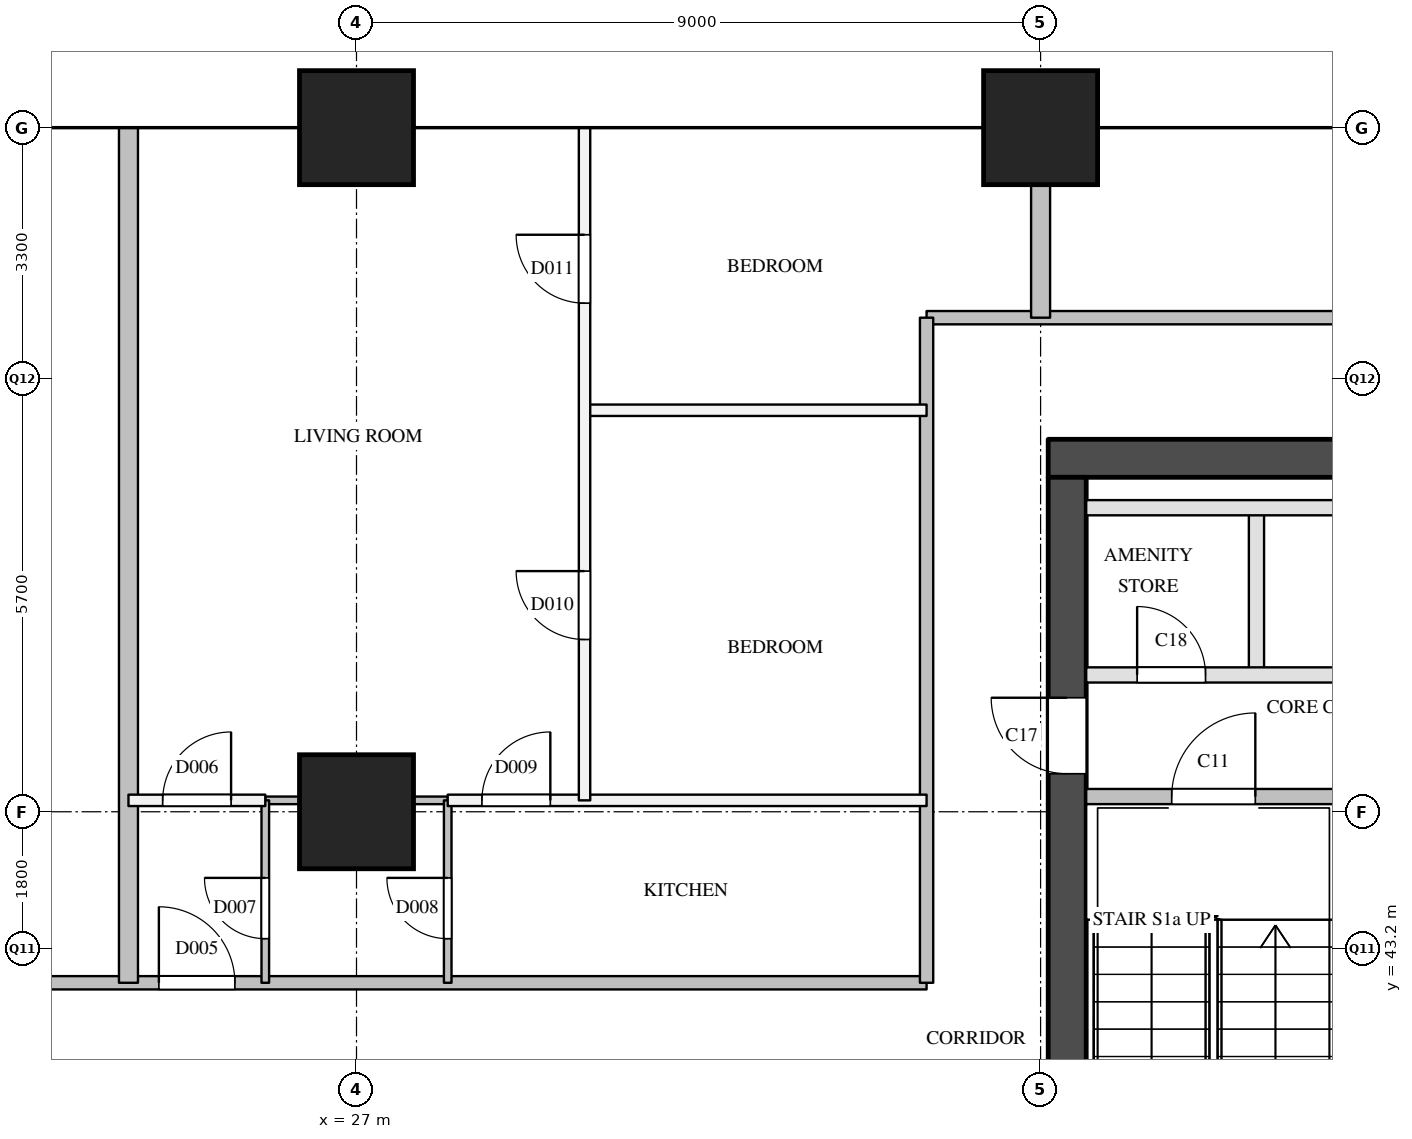
"""IFC4 building model, lengths in metres.
Left out: names, types, materials, properties, quantities, classifications, styles, units other than length and angle.
Written with IfcOpenShell. Run it as: python <this file> out.ifc"""

import sys

from ifc_helpers import new_model, si_unit, direction, frame, frame_2d, origin, origin_2d, place, context, subcontext, project, spatial, rectangle, extrude, element, fill, save


model = new_model("IFC4")
c1 = context("Model", 3, precision=1e-05, world=origin(), true_north=direction((0.0, 1.0)))
c2 = subcontext(c1, "Body", "Model", "MODEL_VIEW")
j1 = project(units=[si_unit("LENGTHUNIT", "METRE"), si_unit("PLANEANGLEUNIT", "RADIAN")], contexts=[c1])
p1 = place(None, origin())
s1 = spatial("IfcSite", under=j1, at=p1, CompositionType="ELEMENT")
p2 = place(p1, origin())
s2 = spatial("IfcBuilding", under=s1, at=p2, CompositionType="ELEMENT")
p3 = place(p2, frame((0.0, 0.0, 129.4)))
s3 = spatial("IfcBuildingStorey", under=s2, at=p3, CompositionType="ELEMENT", Elevation=129.4)
for number, where, z_axis, x_axis in (
    (1, (27.0, 45.0, 0.0), (0.0, 0.0, 1.0), (1.0, 0.0, 0.0)),
    (2, (27.0, 54.0, 0.0), (0.0, 0.0, 1.0), (1.0, 0.0, 0.0)),
    (3, (36.0, 54.0, 0.0), (0.0, 0.0, 1.0), (1.0, 0.0, 0.0)),
):
    element("IfcColumn", number, at=place(p3, frame(where, z_axis=z_axis, x_axis=x_axis)), inside=s3, PredefinedType="COLUMN", context=c2, shape_type="SweptSolid", body=[
        extrude(rectangle(XDim=1.5, YDim=1.5, at=origin_2d()), origin(), (0.0, 0.0, 1.0), 5.5),
    ])
p4 = place(p3, frame((36.1, 49.65, 0.0), z_axis=(0.0, 0.0, 1.0), x_axis=(1.0, 0.0, 0.0)))
e4 = element("IfcWall", 4, at=p4, inside=s3, PredefinedType="SHEAR", context=c2, shape_type="SweptSolid", body=[
    extrude(rectangle(XDim=12.2, YDim=0.5, at=frame_2d((6.1, 0.0))), origin(), (0.0, 0.0, 1.0), 5.2),
])
p5 = place(p3, frame((36.35, 29.1, 0.0), z_axis=(0.0, 0.0, 1.0), x_axis=(0.0, 1.0, 0.0)))
e5 = element("IfcWall", 5, at=p5, inside=s3, PredefinedType="SHEAR", context=c2, shape_type="SweptSolid", body=[
    extrude(rectangle(XDim=20.3, YDim=0.5, at=frame_2d((10.15, 0.0))), origin(), (0.0, 0.0, 1.0), 5.2),
])
p6 = place(p5, frame((3.6, 0.0, 0.0)))
e6 = element("IfcOpeningElement", 6, at=p6, cuts=e5, PredefinedType="OPENING", context=c2, shape_type="SweptSolid", body=[
    extrude(rectangle(XDim=1.8, YDim=2.1, at=frame_2d((0.9, 1.05))), frame((0.0, 0.26, 0.0), z_axis=(0.0, -1.0, 0.0), x_axis=(1.0, 0.0, 0.0)), (0.0, 0.0, 1.0), 0.52),
])
p7 = place(p5, frame((16.4, 0.0, 0.0)))
e7 = element("IfcOpeningElement", 7, at=p7, cuts=e5, PredefinedType="OPENING", context=c2, shape_type="SweptSolid", body=[
    extrude(rectangle(XDim=1.0, YDim=2.1, at=frame_2d((0.5, 1.05))), frame((0.0, 0.26, 0.0), z_axis=(0.0, -1.0, 0.0), x_axis=(1.0, 0.0, 0.0)), (0.0, 0.0, 1.0), 0.52),
])
p8 = place(p3, frame((38.84, 46.8, 0.0), z_axis=(0.0, 0.0, 1.0), x_axis=(0.0, 1.0, 0.0)))
e8 = element("IfcWall", 8, at=p8, inside=s3, PredefinedType="PARTITIONING", context=c2, shape_type="SweptSolid", body=[
    extrude(rectangle(XDim=2.2, YDim=0.2, at=frame_2d((1.1, 0.0))), origin(), (0.0, 0.0, 1.0), 5.2),
])
p9 = place(p3, frame((36.6, 45.2, 0.0), z_axis=(0.0, 0.0, 1.0), x_axis=(1.0, 0.0, 0.0)))
e9 = element("IfcWall", 9, at=p9, inside=s3, PredefinedType="SOLIDWALL", context=c2, shape_type="SweptSolid", body=[
    extrude(rectangle(XDim=3.25, YDim=0.2, at=frame_2d((1.625, 0.0))), origin(), (0.0, 0.0, 1.0), 5.2),
])
p10 = place(p9, frame((1.125, 0.0, 0.0)))
e10 = element("IfcOpeningElement", 10, at=p10, cuts=e9, PredefinedType="OPENING", context=c2, shape_type="SweptSolid", body=[
    extrude(rectangle(XDim=1.1, YDim=2.1, at=frame_2d((0.55, 1.05))), frame((0.0, 0.11, 0.0), z_axis=(0.0, -1.0, 0.0), x_axis=(1.0, 0.0, 0.0)), (0.0, 0.0, 1.0), 0.22),
])
p11 = place(p3, frame((36.6, 46.8, 0.0), z_axis=(0.0, 0.0, 1.0), x_axis=(1.0, 0.0, 0.0)))
e11 = element("IfcWall", 11, at=p11, inside=s3, PredefinedType="PARTITIONING", context=c2, shape_type="SweptSolid", body=[
    extrude(rectangle(XDim=11.2, YDim=0.2, at=frame_2d((5.6, 0.0))), origin(), (0.0, 0.0, 1.0), 5.2),
])
p12 = place(p11, frame((0.67, 0.0, 0.0)))
e12 = element("IfcOpeningElement", 12, at=p12, cuts=e11, PredefinedType="OPENING", context=c2, shape_type="SweptSolid", body=[
    extrude(rectangle(XDim=0.9, YDim=2.1, at=frame_2d((0.45, 1.05))), frame((0.0, 0.11, 0.0), z_axis=(0.0, -1.0, 0.0), x_axis=(1.0, 0.0, 0.0)), (0.0, 0.0, 1.0), 0.22),
])
p13 = place(p11, frame((6.27, 0.0, 0.0)))
e13 = element("IfcOpeningElement", 13, at=p13, cuts=e11, PredefinedType="OPENING", context=c2, shape_type="SweptSolid", body=[
    extrude(rectangle(XDim=0.9, YDim=2.1, at=frame_2d((0.45, 1.05))), frame((0.0, 0.11, 0.0), z_axis=(0.0, -1.0, 0.0), x_axis=(1.0, 0.0, 0.0)), (0.0, 0.0, 1.0), 0.22),
])
p14 = place(p3, frame((36.6, 49.0, 0.0), z_axis=(0.0, 0.0, 1.0), x_axis=(1.0, 0.0, 0.0)))
e14 = element("IfcWall", 14, at=p14, inside=s3, PredefinedType="PARTITIONING", context=c2, shape_type="SweptSolid", body=[
    extrude(rectangle(XDim=11.2, YDim=0.2, at=frame_2d((5.6, 0.0))), origin(), (0.0, 0.0, 1.0), 5.2),
])
p15 = place(p3, frame((19.5, 42.75, 0.0), z_axis=(0.0, 0.0, 1.0), x_axis=(1.0, 0.0, 0.0)))
e15 = element("IfcWall", 15, at=p15, inside=s3, PredefinedType="PARTITIONING", context=c2, shape_type="SweptSolid", body=[
    extrude(rectangle(XDim=15.0, YDim=0.175, at=frame_2d((7.5, 0.0))), origin(), (0.0, 0.0, 1.0), 4.2),
])
p16 = place(p15, frame((4.9, 0.0, 0.0)))
e16 = element("IfcOpeningElement", 16, at=p16, cuts=e15, PredefinedType="OPENING", context=c2, shape_type="SweptSolid", body=[
    extrude(rectangle(XDim=1.0, YDim=2.1, at=frame_2d((0.5, 1.05))), frame((0.0, 0.097, 0.0), z_axis=(0.0, -1.0, 0.0), x_axis=(1.0, 0.0, 0.0)), (0.0, 0.0, 1.0), 0.195),
])
p17 = place(p3, frame((34.5, 51.5, 0.0), z_axis=(0.0, 0.0, 1.0), x_axis=(1.0, 0.0, 0.0)))
e17 = element("IfcWall", 17, at=p17, inside=s3, PredefinedType="PARTITIONING", context=c2, shape_type="SweptSolid", body=[
    extrude(rectangle(XDim=15.4, YDim=0.175, at=frame_2d((7.7, 0.0))), origin(), (0.0, 0.0, 1.0), 5.2),
])
p18 = place(p3, frame((34.5, 42.75, 0.0), z_axis=(0.0, 0.0, 1.0), x_axis=(0.0, 1.0, 0.0)))
e18 = element("IfcWall", 18, at=p18, inside=s3, PredefinedType="PARTITIONING", context=c2, shape_type="SweptSolid", body=[
    extrude(rectangle(XDim=8.75, YDim=0.175, at=frame_2d((4.375, 0.0))), origin(), (0.0, 0.0, 1.0), 5.2),
])
p19 = place(p3, frame((24.0, 45.15, 0.0), z_axis=(0.0, 0.0, 1.0), x_axis=(1.0, 0.0, 0.0)))
e19 = element("IfcWall", 19, at=p19, inside=s3, PredefinedType="PARTITIONING", context=c2, shape_type="SweptSolid", body=[
    extrude(rectangle(XDim=1.8, YDim=0.15, at=frame_2d((0.9, 0.0))), origin(), (0.0, 0.0, 1.0), 5.2),
])
p20 = place(p19, frame((0.45, 0.0, 0.0)))
e20 = element("IfcOpeningElement", 20, at=p20, cuts=e19, PredefinedType="OPENING", context=c2, shape_type="SweptSolid", body=[
    extrude(rectangle(XDim=0.9, YDim=2.1, at=frame_2d((0.45, 1.05))), frame((0.0, 0.085, 0.0), z_axis=(0.0, -1.0, 0.0), x_axis=(1.0, 0.0, 0.0)), (0.0, 0.0, 1.0), 0.17),
])
p21 = place(p3, frame((28.2, 45.15, 0.0), z_axis=(0.0, 0.0, 1.0), x_axis=(1.0, 0.0, 0.0)))
e21 = element("IfcWall", 21, at=p21, inside=s3, PredefinedType="PARTITIONING", context=c2, shape_type="SweptSolid", body=[
    extrude(rectangle(XDim=6.3, YDim=0.15, at=frame_2d((3.15, 0.0))), origin(), (0.0, 0.0, 1.0), 5.2),
])
p22 = place(p21, frame((0.45, 0.0, 0.0)))
e22 = element("IfcOpeningElement", 22, at=p22, cuts=e21, PredefinedType="OPENING", context=c2, shape_type="SweptSolid", body=[
    extrude(rectangle(XDim=0.9, YDim=2.1, at=frame_2d((0.45, 1.05))), frame((0.0, 0.085, 0.0), z_axis=(0.0, -1.0, 0.0), x_axis=(1.0, 0.0, 0.0)), (0.0, 0.0, 1.0), 0.17),
])
p23 = place(p3, frame((30.0, 50.282, 0.0), z_axis=(0.0, 0.0, 1.0), x_axis=(1.0, 0.0, 0.0)))
e23 = element("IfcWall", 23, at=p23, inside=s3, PredefinedType="PARTITIONING", context=c2, shape_type="SweptSolid", body=[
    extrude(rectangle(XDim=4.5, YDim=0.15, at=frame_2d((2.25, 0.0))), origin(), (0.0, 0.0, 1.0), 5.2),
])
p24 = place(p3, frame((30.0, 45.15, 0.0), z_axis=(0.0, 0.0, 1.0), x_axis=(0.0, 1.0, 0.0)))
e24 = element("IfcWall", 24, at=p24, inside=s3, PredefinedType="PARTITIONING", context=c2, shape_type="SweptSolid", body=[
    extrude(rectangle(XDim=8.85, YDim=0.15, at=frame_2d((4.425, 0.0))), origin(), (0.0, 0.0, 1.0), 4.2),
])
p25 = place(p24, frame((2.116, 0.0, 0.0)))
e25 = element("IfcOpeningElement", 25, at=p25, cuts=e24, PredefinedType="OPENING", context=c2, shape_type="SweptSolid", body=[
    extrude(rectangle(XDim=0.9, YDim=2.1, at=frame_2d((0.45, 1.05))), frame((0.0, 0.085, 0.0), z_axis=(0.0, -1.0, 0.0), x_axis=(1.0, 0.0, 0.0)), (0.0, 0.0, 1.0), 0.17),
])
p26 = place(p24, frame((6.541, 0.0, 0.0)))
e26 = element("IfcOpeningElement", 26, at=p26, cuts=e24, PredefinedType="OPENING", context=c2, shape_type="SweptSolid", body=[
    extrude(rectangle(XDim=0.9, YDim=2.1, at=frame_2d((0.45, 1.05))), frame((0.0, 0.085, 0.0), z_axis=(0.0, -1.0, 0.0), x_axis=(1.0, 0.0, 0.0)), (0.0, 0.0, 1.0), 0.17),
])
p27 = place(p3, frame((24.0, 42.75, 0.0), z_axis=(0.0, 0.0, 1.0), x_axis=(0.0, 1.0, 0.0)))
e27 = element("IfcWall", 27, at=p27, inside=s3, PredefinedType="PARTITIONING", context=c2, shape_type="SweptSolid", body=[
    extrude(rectangle(XDim=11.25, YDim=0.25, at=frame_2d((5.625, 0.0))), origin(), (0.0, 0.0, 1.0), 4.2),
])
p28 = place(p3, frame((36.0, 51.5, 0.0), z_axis=(0.0, 0.0, 1.0), x_axis=(0.0, 1.0, 0.0)))
e28 = element("IfcWall", 28, at=p28, inside=s3, PredefinedType="PARTITIONING", context=c2, shape_type="SweptSolid", body=[
    extrude(rectangle(XDim=2.5, YDim=0.25, at=frame_2d((1.25, 0.0))), origin(), (0.0, 0.0, 1.0), 5.2),
])
p29 = place(p3, frame((25.8, 45.15, 0.0), z_axis=(0.0, 0.0, 1.0), x_axis=(1.0, 0.0, 0.0)))
e29 = element("IfcWall", 29, at=p29, inside=s3, PredefinedType="PARTITIONING", context=c2, shape_type="SweptSolid", body=[
    extrude(rectangle(XDim=2.4, YDim=0.1, at=frame_2d((1.2, 0.0))), origin(), (0.0, 0.0, 1.0), 5.2),
])
p30 = place(p3, frame((25.8, 42.75, 0.0), z_axis=(0.0, 0.0, 1.0), x_axis=(0.0, 1.0, 0.0)))
e30 = element("IfcWall", 30, at=p30, inside=s3, PredefinedType="PARTITIONING", context=c2, shape_type="SweptSolid", body=[
    extrude(rectangle(XDim=2.4, YDim=0.1, at=frame_2d((1.2, 0.0))), origin(), (0.0, 0.0, 1.0), 5.2),
])
p31 = place(p30, frame((0.58, 0.0, 0.0)))
e31 = element("IfcOpeningElement", 31, at=p31, cuts=e30, PredefinedType="OPENING", context=c2, shape_type="SweptSolid", body=[
    extrude(rectangle(XDim=0.8, YDim=2.1, at=frame_2d((0.4, 1.05))), frame((0.0, 0.06, 0.0), z_axis=(0.0, -1.0, 0.0), x_axis=(1.0, 0.0, 0.0)), (0.0, 0.0, 1.0), 0.12),
])
p32 = place(p3, frame((28.2, 42.75, 0.0), z_axis=(0.0, 0.0, 1.0), x_axis=(0.0, 1.0, 0.0)))
e32 = element("IfcWall", 32, at=p32, inside=s3, PredefinedType="PARTITIONING", context=c2, shape_type="SweptSolid", body=[
    extrude(rectangle(XDim=2.4, YDim=0.1, at=frame_2d((1.2, 0.0))), origin(), (0.0, 0.0, 1.0), 5.2),
])
p33 = place(p32, frame((0.58, 0.0, 0.0)))
e33 = element("IfcOpeningElement", 33, at=p33, cuts=e32, PredefinedType="OPENING", context=c2, shape_type="SweptSolid", body=[
    extrude(rectangle(XDim=0.8, YDim=2.1, at=frame_2d((0.4, 1.05))), frame((0.0, 0.06, 0.0), z_axis=(0.0, -1.0, 0.0), x_axis=(1.0, 0.0, 0.0)), (0.0, 0.0, 1.0), 0.12),
])
p34 = place(p10, origin())
e34 = element("IfcDoor", 34, at=p34, inside=s3, OperationType="SINGLE_SWING_RIGHT", PredefinedType="DOOR", context=c2, shape_type="SweptSolid", body=[
    extrude(rectangle(XDim=1.1, YDim=2.1, at=frame_2d((0.55, 1.05))), frame((0.0, 0.025, 0.0), z_axis=(0.0, -1.0, 0.0), x_axis=(1.0, 0.0, 0.0)), (0.0, 0.0, 1.0), 0.05),
])
fill(e10, e34)
p35 = place(p7, origin())
e35 = element("IfcDoor", 35, at=p35, inside=s3, OperationType="SINGLE_SWING_RIGHT", PredefinedType="DOOR", context=c2, shape_type="SweptSolid", body=[
    extrude(rectangle(XDim=1.0, YDim=2.1, at=frame_2d((0.5, 1.05))), frame((0.0, 0.025, 0.0), z_axis=(0.0, -1.0, 0.0), x_axis=(1.0, 0.0, 0.0)), (0.0, 0.0, 1.0), 0.05),
])
fill(e7, e35)
p36 = place(p12, origin())
e36 = element("IfcDoor", 36, at=p36, inside=s3, OperationType="SINGLE_SWING_LEFT", PredefinedType="DOOR", context=c2, shape_type="SweptSolid", body=[
    extrude(rectangle(XDim=0.9, YDim=2.1, at=frame_2d((0.45, 1.05))), frame((0.0, 0.025, 0.0), z_axis=(0.0, -1.0, 0.0), x_axis=(1.0, 0.0, 0.0)), (0.0, 0.0, 1.0), 0.05),
])
fill(e12, e36)
p37 = place(p16, origin())
e37 = element("IfcDoor", 37, at=p37, inside=s3, OperationType="SINGLE_SWING_LEFT", PredefinedType="DOOR", context=c2, shape_type="SweptSolid", body=[
    extrude(rectangle(XDim=1.0, YDim=2.1, at=frame_2d((0.5, 1.05))), frame((0.0, 0.025, 0.0), z_axis=(0.0, -1.0, 0.0), x_axis=(1.0, 0.0, 0.0)), (0.0, 0.0, 1.0), 0.05),
])
fill(e16, e37)
p38 = place(p20, origin())
e38 = element("IfcDoor", 38, at=p38, inside=s3, OperationType="SINGLE_SWING_RIGHT", PredefinedType="DOOR", context=c2, shape_type="SweptSolid", body=[
    extrude(rectangle(XDim=0.9, YDim=2.1, at=frame_2d((0.45, 1.05))), frame((0.0, 0.025, 0.0), z_axis=(0.0, -1.0, 0.0), x_axis=(1.0, 0.0, 0.0)), (0.0, 0.0, 1.0), 0.05),
])
fill(e20, e38)
p39 = place(p31, origin())
e39 = element("IfcDoor", 39, at=p39, inside=s3, OperationType="SINGLE_SWING_RIGHT", PredefinedType="DOOR", context=c2, shape_type="SweptSolid", body=[
    extrude(rectangle(XDim=0.8, YDim=2.1, at=frame_2d((0.4, 1.05))), frame((0.0, 0.025, 0.0), z_axis=(0.0, -1.0, 0.0), x_axis=(1.0, 0.0, 0.0)), (0.0, 0.0, 1.0), 0.05),
])
fill(e31, e39)
p40 = place(p33, origin())
e40 = element("IfcDoor", 40, at=p40, inside=s3, OperationType="SINGLE_SWING_RIGHT", PredefinedType="DOOR", context=c2, shape_type="SweptSolid", body=[
    extrude(rectangle(XDim=0.8, YDim=2.1, at=frame_2d((0.4, 1.05))), frame((0.0, 0.025, 0.0), z_axis=(0.0, -1.0, 0.0), x_axis=(1.0, 0.0, 0.0)), (0.0, 0.0, 1.0), 0.05),
])
fill(e33, e40)
p41 = place(p22, origin())
e41 = element("IfcDoor", 41, at=p41, inside=s3, OperationType="SINGLE_SWING_RIGHT", PredefinedType="DOOR", context=c2, shape_type="SweptSolid", body=[
    extrude(rectangle(XDim=0.9, YDim=2.1, at=frame_2d((0.45, 1.05))), frame((0.0, 0.025, 0.0), z_axis=(0.0, -1.0, 0.0), x_axis=(1.0, 0.0, 0.0)), (0.0, 0.0, 1.0), 0.05),
])
fill(e22, e41)
p42 = place(p25, origin())
e42 = element("IfcDoor", 42, at=p42, inside=s3, OperationType="SINGLE_SWING_RIGHT", PredefinedType="DOOR", context=c2, shape_type="SweptSolid", body=[
    extrude(rectangle(XDim=0.9, YDim=2.1, at=frame_2d((0.45, 1.05))), frame((0.0, 0.025, 0.0), z_axis=(0.0, -1.0, 0.0), x_axis=(1.0, 0.0, 0.0)), (0.0, 0.0, 1.0), 0.05),
])
fill(e25, e42)
p43 = place(p26, origin())
e43 = element("IfcDoor", 43, at=p43, inside=s3, OperationType="SINGLE_SWING_RIGHT", PredefinedType="DOOR", context=c2, shape_type="SweptSolid", body=[
    extrude(rectangle(XDim=0.9, YDim=2.1, at=frame_2d((0.45, 1.05))), frame((0.0, 0.025, 0.0), z_axis=(0.0, -1.0, 0.0), x_axis=(1.0, 0.0, 0.0)), (0.0, 0.0, 1.0), 0.05),
])
fill(e26, e43)
save(model, sys.argv[1])
